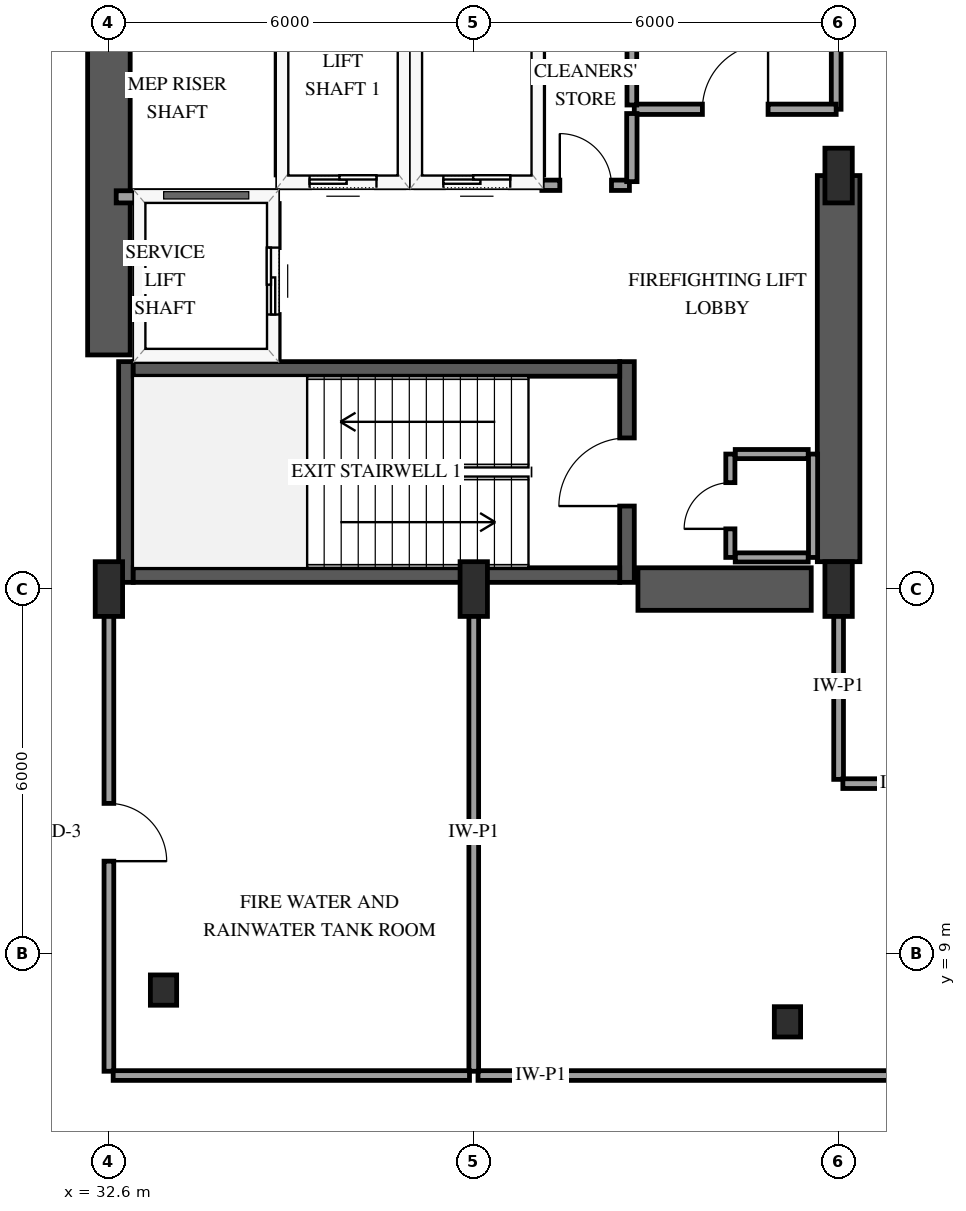
"""IFC4 building model, lengths in metres.
Left out: names, types, materials, properties, quantities, classifications, styles, units other than length and angle.
Written with IfcOpenShell. Run it as: python <this file> out.ifc"""

import sys

from ifc_helpers import new_model, si_unit, direction, frame, frame_2d, origin, origin_2d, place, context, subcontext, project, spatial, rectangle, i_section, extrude, element, fill, save


model = new_model("IFC4")
c1 = context("Model", 3, precision=1e-05, world=origin(), true_north=direction((0.0, 1.0)))
c2 = subcontext(c1, "Body", "Model", "MODEL_VIEW")
j1 = project(units=[si_unit("LENGTHUNIT", "METRE"), si_unit("PLANEANGLEUNIT", "RADIAN")], contexts=[c1])
p1 = place(None, origin())
s1 = spatial("IfcSite", under=j1, at=p1, CompositionType="ELEMENT")
p2 = place(p1, origin())
s2 = spatial("IfcBuilding", under=s1, at=p2, CompositionType="ELEMENT")
p3 = place(p2, frame((0.0, 0.0, -10.2)))
s3 = spatial("IfcBuildingStorey", under=s2, at=p3, CompositionType="ELEMENT", Elevation=-10.2)
p4 = place(p3, frame((32.88, 15.11, -0.4), z_axis=(0.0, 0.0, 1.0), x_axis=(0.0, 1.0, 0.0)))
e1 = element("IfcWall", 1, at=p4, inside=s3, PredefinedType="SHEAR", context=c2, shape_type="SweptSolid", body=[
    extrude(rectangle(XDim=3.63, YDim=0.24, at=frame_2d((1.815, 0.0))), origin(), (0.0, 0.0, 1.0), 5.2),
])
p5 = place(p3, frame((41.12, 15.11, -0.4), z_axis=(0.0, 0.0, 1.0), x_axis=(0.0, 1.0, 0.0)))
e2 = element("IfcWall", 2, at=p5, inside=s3, PredefinedType="SHEAR", context=c2, shape_type="SweptSolid", body=[
    extrude(rectangle(XDim=3.63, YDim=0.24, at=frame_2d((1.815, 0.0))), origin(), (0.0, 0.0, 1.0), 5.2),
])
p6 = place(p5, frame((1.255, 0.0, 0.4)))
e3 = element("IfcOpeningElement", 3, at=p6, cuts=e2, PredefinedType="OPENING", context=c2, shape_type="SweptSolid", body=[
    extrude(rectangle(XDim=1.12, YDim=2.15, at=frame_2d((0.56, 1.075))), frame((0.0, 0.13, 0.0), z_axis=(0.0, -1.0, 0.0), x_axis=(1.0, 0.0, 0.0)), (0.0, 0.0, 1.0), 0.26),
])
for number, where, z_axis, x_axis in (
    (4, (33.0, 15.23, -0.4), (0.0, 0.0, 1.0), (1.0, 0.0, 0.0)),
    (5, (33.0, 18.62, -0.4), (0.0, 0.0, 1.0), (1.0, 0.0, 0.0)),
):
    element("IfcWall", number, at=place(p3, frame(where, z_axis=z_axis, x_axis=x_axis)), inside=s3, PredefinedType="SHEAR", context=c2, shape_type="SweptSolid", body=[
        extrude(rectangle(XDim=8.0, YDim=0.24, at=frame_2d((4.0, 0.0))), origin(), (0.0, 0.0, 1.0), 5.2),
    ])
p7 = place(p3, frame((32.6, 18.85, -0.4), z_axis=(0.0, 0.0, 1.0), x_axis=(0.0, 1.0, 0.0)))
e6 = element("IfcWall", 6, at=p7, inside=s3, PredefinedType="SHEAR", context=c2, shape_type="SweptSolid", body=[
    extrude(rectangle(XDim=12.3, YDim=0.7, at=frame_2d((6.15, 0.0))), origin(), (0.0, 0.0, 1.0), 5.2),
])
p8 = place(p3, frame((41.3, 15.0, -0.4), z_axis=(0.0, 0.0, 1.0), x_axis=(1.0, 0.0, 0.0)))
e7 = element("IfcWall", 7, at=p8, inside=s3, PredefinedType="SHEAR", context=c2, shape_type="SweptSolid", body=[
    extrude(rectangle(XDim=2.85, YDim=0.7, at=frame_2d((1.425, 0.0))), origin(), (0.0, 0.0, 1.0), 5.2),
])
p9 = place(p3, frame((44.6, 15.45, -0.4), z_axis=(0.0, 0.0, 1.0), x_axis=(0.0, 1.0, 0.0)))
e8 = element("IfcWall", 8, at=p9, inside=s3, PredefinedType="SHEAR", context=c2, shape_type="SweptSolid", body=[
    extrude(rectangle(XDim=6.35, YDim=0.7, at=frame_2d((3.175, 0.0))), origin(), (0.0, 0.0, 1.0), 5.2),
])
for number, where, z_axis, x_axis in (
    (9, (32.6, 15.0, -0.4), (0.0, 0.0, 1.0), (1.0, 0.0, 0.0)),
    (10, (38.6, 15.0, -0.4), (0.0, 0.0, 1.0), (1.0, 0.0, 0.0)),
    (11, (44.6, 15.0, -0.4), (0.0, 0.0, 1.0), (1.0, 0.0, 0.0)),
    (12, (44.6, 21.8, -0.4), (0.0, 0.0, 1.0), (1.0, 0.0, 0.0)),
):
    element("IfcColumn", number, at=place(p3, frame(where, z_axis=z_axis, x_axis=x_axis)), inside=s3, PredefinedType="PILASTER", context=c2, shape_type="SweptSolid", body=[
        extrude(rectangle(XDim=0.45, YDim=0.9, at=origin_2d()), origin(), (0.0, 0.0, 1.0), 5.2),
    ])
for number, where, z_axis, x_axis in (
    (13, (33.498, 8.405, -0.4), (0.0, 0.0, 1.0), (1.0, 0.0, 0.0)),
    (14, (43.759, 7.883, -0.4), (0.0, 0.0, 1.0), (1.0, 0.0, 0.0)),
):
    element("IfcColumn", number, at=place(p3, frame(where, z_axis=z_axis, x_axis=x_axis)), inside=s3, PredefinedType="COLUMN", context=c2, shape_type="SweptSolid", body=[
        extrude(i_section(OverallWidth=0.432, OverallDepth=0.498, WebThickness=0.056, FlangeThickness=0.089, FilletRadius=0.038, at=origin_2d()), origin(), (0.0, 0.0, 1.0), 5.2),
    ])
p10 = place(p3, frame((35.45, 21.7, 0.0), z_axis=(0.0, 0.0, 1.0), x_axis=(1.0, 0.0, 0.0)))
e15 = element("IfcWall", 15, at=p10, inside=s3, PredefinedType="SOLIDWALL", context=c2, shape_type="SweptSolid", body=[
    extrude(rectangle(XDim=2.0, YDim=0.2, at=frame_2d((1.0, 0.0))), origin(), (0.0, 0.0, 1.0), 4.44),
])
p11 = place(p10, frame((0.45, 0.0, 0.0)))
e16 = element("IfcOpeningElement", 16, at=p11, cuts=e15, PredefinedType="OPENING", context=c2, shape_type="SweptSolid", body=[
    extrude(rectangle(XDim=1.1, YDim=2.15, at=frame_2d((0.55, 1.075))), frame((0.0, 0.11, 0.0), z_axis=(0.0, -1.0, 0.0), x_axis=(1.0, 0.0, 0.0)), (0.0, 0.0, 1.0), 0.22),
])
for number, where, z_axis, x_axis in (
    (17, (35.45, 21.81, 0.0), (0.0, 0.0, 1.0), (0.0, 1.0, 0.0)),
    (18, (37.45, 21.81, 0.0), (0.0, 0.0, 1.0), (0.0, 1.0, 0.0)),
):
    element("IfcWall", number, at=place(p3, frame(where, z_axis=z_axis, x_axis=x_axis)), inside=s3, PredefinedType="SOLIDWALL", context=c2, shape_type="SweptSolid", body=[
        extrude(rectangle(XDim=2.38, YDim=0.2, at=frame_2d((1.19, 0.0))), origin(), (0.0, 0.0, 1.0), 4.44),
    ])
p12 = place(p3, frame((37.65, 21.7, 0.0), z_axis=(0.0, 0.0, 1.0), x_axis=(1.0, 0.0, 0.0)))
e19 = element("IfcWall", 19, at=p12, inside=s3, PredefinedType="SOLIDWALL", context=c2, shape_type="SweptSolid", body=[
    extrude(rectangle(XDim=2.0, YDim=0.2, at=frame_2d((1.0, 0.0))), origin(), (0.0, 0.0, 1.0), 4.44),
])
p13 = place(p12, frame((0.45, 0.0, 0.0)))
e20 = element("IfcOpeningElement", 20, at=p13, cuts=e19, PredefinedType="OPENING", context=c2, shape_type="SweptSolid", body=[
    extrude(rectangle(XDim=1.1, YDim=2.15, at=frame_2d((0.55, 1.075))), frame((0.0, 0.11, 0.0), z_axis=(0.0, -1.0, 0.0), x_axis=(1.0, 0.0, 0.0)), (0.0, 0.0, 1.0), 0.22),
])
p14 = place(p3, frame((39.65, 21.81, 0.0), z_axis=(0.0, 0.0, 1.0), x_axis=(0.0, 1.0, 0.0)))
e21 = element("IfcWall", 21, at=p14, inside=s3, PredefinedType="SOLIDWALL", context=c2, shape_type="SweptSolid", body=[
    extrude(rectangle(XDim=2.38, YDim=0.2, at=frame_2d((1.19, 0.0))), origin(), (0.0, 0.0, 1.0), 4.44),
])
p15 = place(p3, frame((32.72, 21.45, 0.0), z_axis=(0.0, 0.0, 1.0), x_axis=(1.0, 0.0, 0.0)))
e22 = element("IfcWall", 22, at=p15, inside=s3, PredefinedType="SOLIDWALL", context=c2, shape_type="SweptSolid", body=[
    extrude(rectangle(XDim=2.58, YDim=0.2, at=frame_2d((1.29, 0.0))), origin(), (0.0, 0.0, 1.0), 4.44),
])
p16 = place(p3, frame((35.3, 18.79, 0.0), z_axis=(0.0, 0.0, 1.0), x_axis=(0.0, 1.0, 0.0)))
e23 = element("IfcWall", 23, at=p16, inside=s3, PredefinedType="SOLIDWALL", context=c2, shape_type="SweptSolid", body=[
    extrude(rectangle(XDim=2.55, YDim=0.2, at=frame_2d((1.275, 0.0))), origin(), (0.0, 0.0, 1.0), 4.44),
])
p17 = place(p16, frame((0.725, 0.0, 0.0)))
e24 = element("IfcOpeningElement", 24, at=p17, cuts=e23, PredefinedType="OPENING", context=c2, shape_type="SweptSolid", body=[
    extrude(rectangle(XDim=1.1, YDim=2.15, at=frame_2d((0.55, 1.075))), frame((0.0, 0.11, 0.0), z_axis=(0.0, -1.0, 0.0), x_axis=(1.0, 0.0, 0.0)), (0.0, 0.0, 1.0), 0.22),
])
for number, where, z_axis, x_axis in (
    (25, (42.9, 15.52, 0.0), (0.0, 0.0, 1.0), (1.0, 0.0, 0.0)),
    (26, (42.9, 17.22, 0.0), (0.0, 0.0, 1.0), (1.0, 0.0, 0.0)),
):
    element("IfcWall", number, at=place(p3, frame(where, z_axis=z_axis, x_axis=x_axis)), inside=s3, PredefinedType="PARTITIONING", context=c2, shape_type="SweptSolid", body=[
        extrude(rectangle(XDim=1.2, YDim=0.15, at=frame_2d((0.6, 0.0))), origin(), (0.0, 0.0, 1.0), 4.44),
    ])
p18 = place(p3, frame((44.18, 15.52, 0.0), z_axis=(0.0, 0.0, 1.0), x_axis=(0.0, 1.0, 0.0)))
e27 = element("IfcWall", 27, at=p18, inside=s3, PredefinedType="PARTITIONING", context=c2, shape_type="SweptSolid", body=[
    extrude(rectangle(XDim=1.7, YDim=0.15, at=frame_2d((0.85, 0.0))), origin(), (0.0, 0.0, 1.0), 4.44),
])
p19 = place(p3, frame((42.82, 15.52, 0.0), z_axis=(0.0, 0.0, 1.0), x_axis=(0.0, 1.0, 0.0)))
e28 = element("IfcWall", 28, at=p19, inside=s3, PredefinedType="PARTITIONING", context=c2, shape_type="SweptSolid", body=[
    extrude(rectangle(XDim=1.7, YDim=0.15, at=frame_2d((0.85, 0.0))), origin(), (0.0, 0.0, 1.0), 4.44),
])
p20 = place(p19, frame((0.47, 0.0, 0.0)))
e29 = element("IfcOpeningElement", 29, at=p20, cuts=e28, PredefinedType="OPENING", context=c2, shape_type="SweptSolid", body=[
    extrude(rectangle(XDim=0.76, YDim=2.0, at=frame_2d((0.38, 1.0))), frame((0.0, 0.085, 0.0), z_axis=(0.0, -1.0, 0.0), x_axis=(1.0, 0.0, 0.0)), (0.0, 0.0, 1.0), 0.17),
])
p21 = place(p3, frame((38.67, 7.0, 0.0), z_axis=(0.0, 0.0, 1.0), x_axis=(1.0, 0.0, 0.0)))
e30 = element("IfcWall", 30, at=p21, inside=s3, PredefinedType="PARTITIONING", context=c2, shape_type="SweptSolid", body=[
    extrude(rectangle(XDim=8.06, YDim=0.16, at=frame_2d((4.03, 0.0))), origin(), (0.0, 0.0, 1.0), 4.44),
])
p22 = place(p3, frame((32.6, 14.93, 0.0), z_axis=(0.0, 0.0, 1.0), x_axis=(0.0, -1.0, 0.0)))
e31 = element("IfcWall", 31, at=p22, inside=s3, PredefinedType="PARTITIONING", context=c2, shape_type="SweptSolid", body=[
    extrude(rectangle(XDim=7.86, YDim=0.16, at=frame_2d((3.93, 0.0))), origin(), (0.0, 0.0, 1.0), 3.562),
])
p23 = place(p22, frame((3.455, 0.0, 0.0)))
e32 = element("IfcOpeningElement", 32, at=p23, cuts=e31, PredefinedType="OPENING", context=c2, shape_type="SweptSolid", body=[
    extrude(rectangle(XDim=0.95, YDim=2.15, at=frame_2d((0.475, 1.075))), frame((0.0, 0.09, 0.0), z_axis=(0.0, -1.0, 0.0), x_axis=(1.0, 0.0, 0.0)), (0.0, 0.0, 1.0), 0.18),
])
p24 = place(p3, frame((38.6, 14.93, 0.0), z_axis=(0.0, 0.0, 1.0), x_axis=(0.0, -1.0, 0.0)))
e33 = element("IfcWall", 33, at=p24, inside=s3, PredefinedType="PARTITIONING", context=c2, shape_type="SweptSolid", body=[
    extrude(rectangle(XDim=7.86, YDim=0.16, at=frame_2d((3.93, 0.0))), origin(), (0.0, 0.0, 1.0), 4.44),
])
p25 = place(p3, frame((44.56, 29.8, 0.0), z_axis=(0.0, 0.0, 1.0), x_axis=(0.0, -1.0, 0.0)))
e34 = element("IfcWall", 34, at=p25, inside=s3, PredefinedType="PARTITIONING", context=c2, shape_type="SweptSolid", body=[
    extrude(rectangle(XDim=6.91, YDim=0.16, at=frame_2d((3.455, 0.0))), origin(), (0.0, 0.0, 1.0), 3.48),
])
p26 = place(p25, frame((2.915, 0.0, 0.0)))
e35 = element("IfcOpeningElement", 35, at=p26, cuts=e34, PredefinedType="OPENING", context=c2, shape_type="SweptSolid", body=[
    extrude(rectangle(XDim=1.38, YDim=2.2, at=frame_2d((0.69, 1.1))), frame((0.0, 0.09, 0.0), z_axis=(0.0, -1.0, 0.0), x_axis=(1.0, 0.0, 0.0)), (0.0, 0.0, 1.0), 0.18),
])
p27 = place(p3, frame((32.67, 7.0, 0.0), z_axis=(0.0, 0.0, 1.0), x_axis=(1.0, 0.0, 0.0)))
e36 = element("IfcWall", 36, at=p27, inside=s3, PredefinedType="PARTITIONING", context=c2, shape_type="SweptSolid", body=[
    extrude(rectangle(XDim=5.86, YDim=0.16, at=frame_2d((2.93, 0.0))), origin(), (0.0, 0.0, 1.0), 4.44),
])
p28 = place(p3, frame((41.24, 22.89, 0.0), z_axis=(0.0, 0.0, 1.0), x_axis=(1.0, 0.0, 0.0)))
e37 = element("IfcWall", 37, at=p28, inside=s3, PredefinedType="PARTITIONING", context=c2, shape_type="SweptSolid", body=[
    extrude(rectangle(XDim=3.32, YDim=0.17, at=frame_2d((1.66, 0.0))), origin(), (0.0, 0.0, 1.0), 4.44),
])
p29 = place(p28, frame((1.12, 0.0, 0.0)))
e38 = element("IfcOpeningElement", 38, at=p29, cuts=e37, PredefinedType="OPENING", context=c2, shape_type="SweptSolid", body=[
    extrude(rectangle(XDim=1.08, YDim=2.15, at=frame_2d((0.54, 1.075))), frame((0.0, 0.095, 0.0), z_axis=(0.0, -1.0, 0.0), x_axis=(1.0, 0.0, 0.0)), (0.0, 0.0, 1.0), 0.19),
])
p30 = place(p3, frame((44.6, 11.87, 0.0), z_axis=(0.0, 0.0, 1.0), x_axis=(0.0, 1.0, 0.0)))
e39 = element("IfcWall", 39, at=p30, inside=s3, PredefinedType="PARTITIONING", context=c2, shape_type="SweptSolid", body=[
    extrude(rectangle(XDim=3.06, YDim=0.16, at=frame_2d((1.53, 0.0))), origin(), (0.0, 0.0, 1.0), 3.562),
])
p31 = place(p3, frame((46.73, 11.8, 0.0), z_axis=(0.0, 0.0, 1.0), x_axis=(-1.0, 0.0, 0.0)))
e40 = element("IfcWall", 40, at=p31, inside=s3, PredefinedType="PARTITIONING", context=c2, shape_type="SweptSolid", body=[
    extrude(rectangle(XDim=2.06, YDim=0.16, at=frame_2d((1.03, 0.0))), origin(), (0.0, 0.0, 1.0), 4.44),
])
p32 = place(p3, frame((41.2, 22.96, 0.0), z_axis=(0.0, 0.0, 1.0), x_axis=(0.0, 1.0, 0.0)))
e41 = element("IfcWall", 41, at=p32, inside=s3, PredefinedType="PARTITIONING", context=c2, shape_type="SweptSolid", body=[
    extrude(rectangle(XDim=1.46, YDim=0.16, at=frame_2d((0.73, 0.0))), origin(), (0.0, 0.0, 1.0), 4.44),
])
p33 = place(p3, frame((39.72, 21.64, 0.0), z_axis=(0.0, 0.0, 1.0), x_axis=(1.0, 0.0, 0.0)))
e42 = element("IfcWall", 42, at=p33, inside=s3, PredefinedType="PARTITIONING", context=c2, shape_type="SweptSolid", body=[
    extrude(rectangle(XDim=1.44, YDim=0.17, at=frame_2d((0.72, 0.0))), origin(), (0.0, 0.0, 1.0), 4.44),
])
p34 = place(p33, frame((0.295, 0.0, 0.0)))
e43 = element("IfcOpeningElement", 43, at=p34, cuts=e42, PredefinedType="OPENING", context=c2, shape_type="SweptSolid", body=[
    extrude(rectangle(XDim=0.85, YDim=2.1, at=frame_2d((0.425, 1.05))), frame((0.0, 0.095, 0.0), z_axis=(0.0, -1.0, 0.0), x_axis=(1.0, 0.0, 0.0)), (0.0, 0.0, 1.0), 0.19),
])
p35 = place(p3, frame((41.2, 21.7, 0.0), z_axis=(0.0, 0.0, 1.0), x_axis=(0.0, 1.0, 0.0)))
e44 = element("IfcWall", 44, at=p35, inside=s3, PredefinedType="PARTITIONING", context=c2, shape_type="SweptSolid", body=[
    extrude(rectangle(XDim=1.12, YDim=0.17, at=frame_2d((0.56, 0.0))), origin(), (0.0, 0.0, 1.0), 4.44),
])
p36 = place(p11, origin())
e45 = element("IfcDoor", 45, at=p36, inside=s3, OperationType="SLIDING_TO_LEFT", PredefinedType="DOOR", context=c2, shape_type="SweptSolid", body=[
    extrude(rectangle(XDim=1.1, YDim=2.15, at=frame_2d((0.55, 1.075))), frame((0.0, 0.025, 0.0), z_axis=(0.0, -1.0, 0.0), x_axis=(1.0, 0.0, 0.0)), (0.0, 0.0, 1.0), 0.05),
])
fill(e16, e45)
p37 = place(p13, origin())
e46 = element("IfcDoor", 46, at=p37, inside=s3, OperationType="SLIDING_TO_LEFT", PredefinedType="DOOR", context=c2, shape_type="SweptSolid", body=[
    extrude(rectangle(XDim=1.1, YDim=2.15, at=frame_2d((0.55, 1.075))), frame((0.0, 0.025, 0.0), z_axis=(0.0, -1.0, 0.0), x_axis=(1.0, 0.0, 0.0)), (0.0, 0.0, 1.0), 0.05),
])
fill(e20, e46)
p38 = place(p17, origin())
e47 = element("IfcDoor", 47, at=p38, inside=s3, OperationType="SLIDING_TO_LEFT", PredefinedType="DOOR", context=c2, shape_type="SweptSolid", body=[
    extrude(rectangle(XDim=1.1, YDim=2.15, at=frame_2d((0.55, 1.075))), frame((0.0, 0.025, 0.0), z_axis=(0.0, -1.0, 0.0), x_axis=(1.0, 0.0, 0.0)), (0.0, 0.0, 1.0), 0.05),
])
fill(e24, e47)
p39 = place(p6, origin())
e48 = element("IfcDoor", 48, at=p39, inside=s3, OperationType="SINGLE_SWING_LEFT", PredefinedType="DOOR", context=c2, shape_type="SweptSolid", body=[
    extrude(rectangle(XDim=1.12, YDim=2.15, at=frame_2d((0.56, 1.075))), frame((0.0, 0.025, 0.0), z_axis=(0.0, -1.0, 0.0), x_axis=(1.0, 0.0, 0.0)), (0.0, 0.0, 1.0), 0.05),
])
fill(e3, e48)
p40 = place(p20, origin())
e49 = element("IfcDoor", 49, at=p40, inside=s3, OperationType="SINGLE_SWING_LEFT", PredefinedType="TRAPDOOR", context=c2, shape_type="SweptSolid", body=[
    extrude(rectangle(XDim=0.76, YDim=2.0, at=frame_2d((0.38, 1.0))), frame((0.0, 0.025, 0.0), z_axis=(0.0, -1.0, 0.0), x_axis=(1.0, 0.0, 0.0)), (0.0, 0.0, 1.0), 0.05),
])
fill(e29, e49)
p41 = place(p23, origin())
e50 = element("IfcDoor", 50, at=p41, inside=s3, OperationType="SINGLE_SWING_RIGHT", PredefinedType="DOOR", context=c2, shape_type="SweptSolid", body=[
    extrude(rectangle(XDim=0.95, YDim=2.15, at=frame_2d((0.475, 1.075))), frame((0.0, 0.025, 0.0), z_axis=(0.0, -1.0, 0.0), x_axis=(1.0, 0.0, 0.0)), (0.0, 0.0, 1.0), 0.05),
])
fill(e32, e50)
p42 = place(p29, origin())
e51 = element("IfcDoor", 51, at=p42, inside=s3, OperationType="SINGLE_SWING_RIGHT", PredefinedType="DOOR", context=c2, shape_type="SweptSolid", body=[
    extrude(rectangle(XDim=1.08, YDim=2.15, at=frame_2d((0.54, 1.075))), frame((0.0, 0.025, 0.0), z_axis=(0.0, -1.0, 0.0), x_axis=(1.0, 0.0, 0.0)), (0.0, 0.0, 1.0), 0.05),
])
fill(e38, e51)
p43 = place(p34, origin())
e52 = element("IfcDoor", 52, at=p43, inside=s3, OperationType="SINGLE_SWING_LEFT", PredefinedType="DOOR", context=c2, shape_type="SweptSolid", body=[
    extrude(rectangle(XDim=0.85, YDim=2.1, at=frame_2d((0.425, 1.05))), frame((0.0, 0.025, 0.0), z_axis=(0.0, -1.0, 0.0), x_axis=(1.0, 0.0, 0.0)), (0.0, 0.0, 1.0), 0.05),
])
fill(e43, e52)
save(model, sys.argv[1])
